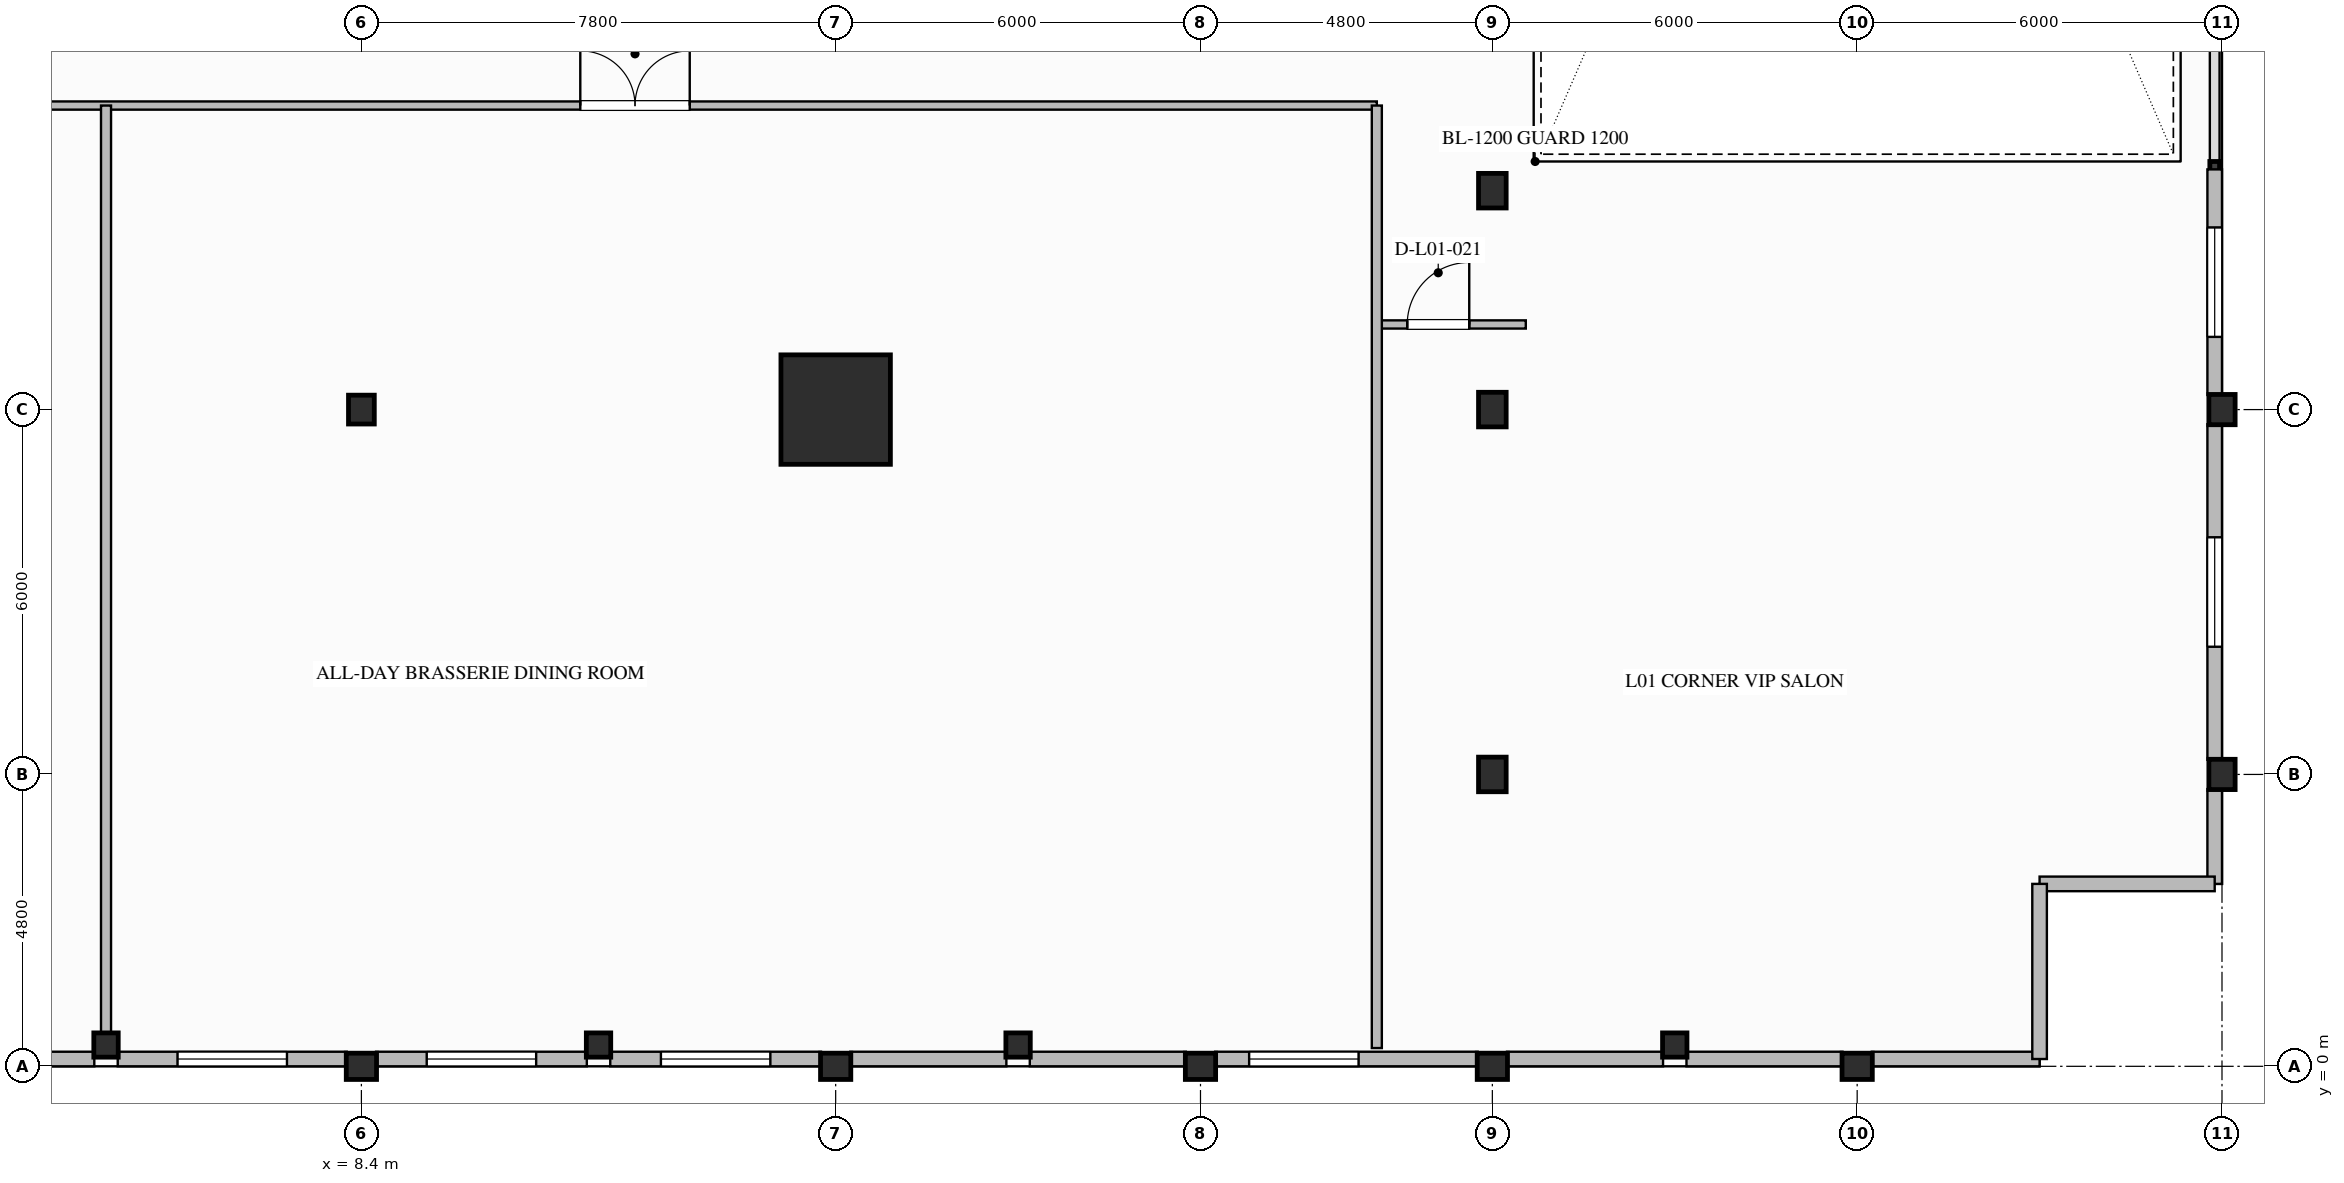
"""IFC4 building model, lengths in metres.
Left out: names, types, materials, properties, quantities, classifications, styles, units other than length and angle.
Written with IfcOpenShell. Run it as: python <this file> out.ifc"""

import sys

from ifc_helpers import new_model, si_unit, direction, frame, frame_2d, origin, origin_2d, place, context, subcontext, project, spatial, rectangle, i_section, extrude, element, fill, save


model = new_model("IFC4")
c1 = context("Model", 3, precision=1e-05, world=origin(), true_north=direction((0.0, 1.0)))
c2 = subcontext(c1, "Body", "Model", "MODEL_VIEW")
j1 = project(units=[si_unit("LENGTHUNIT", "METRE"), si_unit("PLANEANGLEUNIT", "RADIAN")], contexts=[c1])
p1 = place(None, origin())
s1 = spatial("IfcSite", under=j1, at=p1, CompositionType="ELEMENT")
p2 = place(p1, origin())
s2 = spatial("IfcBuilding", under=s1, at=p2, CompositionType="ELEMENT")
p3 = place(p2, frame((0.0, 0.0, 5.6)))
s3 = spatial("IfcBuildingStorey", under=s2, at=p3, CompositionType="ELEMENT", Elevation=5.6)
p4 = place(p3, frame((16.2, 10.8, 0.0), z_axis=(0.0, 0.0, 1.0), x_axis=(1.0, 0.0, 0.0)))
e1 = element("IfcColumn", 1, at=p4, inside=s3, PredefinedType="COLUMN", context=c2, shape_type="SweptSolid", body=[
    extrude(rectangle(XDim=1.8, YDim=1.8, at=origin_2d()), origin(), (0.0, 0.0, 1.0), 5.2),
])
for number, where, z_axis, x_axis in (
    (2, (39.0, 4.8, 0.0), (0.0, 0.0, 1.0), (1.0, 0.0, 0.0)),
    (3, (39.0, 10.8, 0.0), (0.0, 0.0, 1.0), (1.0, 0.0, 0.0)),
    (4, (8.4, 0.0, 0.0), (0.0, 0.0, 1.0), (0.0, 1.0, 0.0)),
    (5, (16.2, 0.0, 0.0), (0.0, 0.0, 1.0), (0.0, 1.0, 0.0)),
    (6, (22.2, 0.0, 0.0), (0.0, 0.0, 1.0), (0.0, 1.0, 0.0)),
    (7, (27.0, 0.0, 0.0), (0.0, 0.0, 1.0), (0.0, 1.0, 0.0)),
    (8, (33.0, 0.0, 0.0), (0.0, 0.0, 1.0), (0.0, 1.0, 0.0)),
):
    element("IfcColumn", number, at=place(p3, frame(where, z_axis=z_axis, x_axis=x_axis)), inside=s3, PredefinedType="COLUMN", context=c2, shape_type="SweptSolid", body=[
        extrude(i_section(OverallWidth=0.432, OverallDepth=0.498, WebThickness=0.056, FlangeThickness=0.089, FilletRadius=0.03, at=origin_2d()), origin(), (0.0, 0.0, 1.0), 5.2),
    ])
for number, where, z_axis, x_axis in (
    (9, (27.0, 4.8, 0.0), (0.0, 0.0, 1.0), (1.0, 0.0, 0.0)),
    (10, (27.0, 10.8, 0.0), (0.0, 0.0, 1.0), (1.0, 0.0, 0.0)),
    (11, (27.0, 14.4, 0.0), (0.0, 0.0, 1.0), (1.0, 0.0, 0.0)),
):
    element("IfcColumn", number, at=place(p3, frame(where, z_axis=z_axis, x_axis=x_axis)), inside=s3, PredefinedType="COLUMN", context=c2, shape_type="SweptSolid", body=[
        extrude(i_section(OverallWidth=0.454, OverallDepth=0.569, WebThickness=0.078, FlangeThickness=0.125, FilletRadius=0.03, at=origin_2d()), origin(), (0.0, 0.0, 1.0), 5.2),
    ])
p5 = place(p3, frame((8.4, 10.8, 0.0), z_axis=(0.0, 0.0, 1.0), x_axis=(1.0, 0.0, 0.0)))
e12 = element("IfcColumn", 12, at=p5, inside=s3, PredefinedType="COLUMN", context=c2, shape_type="SweptSolid", body=[
    extrude(i_section(OverallWidth=0.424, OverallDepth=0.474, WebThickness=0.048, FlangeThickness=0.077, FilletRadius=0.03, at=origin_2d()), origin(), (0.0, 0.0, 1.0), 5.2),
])
for number, where, z_axis, x_axis in (
    (13, (4.2, 0.35, 0.0), (0.0, 0.0, 1.0), (1.0, 0.0, 0.0)),
    (14, (12.3, 0.35, 0.0), (0.0, 0.0, 1.0), (1.0, 0.0, 0.0)),
    (15, (19.2, 0.35, 0.0), (0.0, 0.0, 1.0), (1.0, 0.0, 0.0)),
    (16, (30.0, 0.35, 0.0), (0.0, 0.0, 1.0), (1.0, 0.0, 0.0)),
):
    element("IfcColumn", number, at=place(p3, frame(where, z_axis=z_axis, x_axis=x_axis)), inside=s3, PredefinedType="COLUMN", context=c2, shape_type="SweptSolid", body=[
        extrude(i_section(OverallWidth=0.401, OverallDepth=0.399, WebThickness=0.025, FlangeThickness=0.04, FilletRadius=0.025, at=origin_2d()), origin(), (0.0, 0.0, 1.0), 5.2),
    ])
p6 = place(p3, frame((38.88, 4.559, 0.0), z_axis=(0.0, 0.0, 1.0), x_axis=(0.0, -1.0, 0.0)))
e17 = element("IfcWall", 17, at=p6, inside=s3, PredefinedType="STANDARD", context=c2, shape_type="SweptSolid", body=[
    extrude(rectangle(XDim=1.559, YDim=0.24, at=frame_2d((0.78, 0.0))), origin(), (0.0, 0.0, 1.0), 4.85),
])
p7 = place(p3, frame((38.88, 10.559, 0.0), z_axis=(0.0, 0.0, 1.0), x_axis=(0.0, -1.0, 0.0)))
e18 = element("IfcWall", 18, at=p7, inside=s3, PredefinedType="STANDARD", context=c2, shape_type="SweptSolid", body=[
    extrude(rectangle(XDim=5.518, YDim=0.24, at=frame_2d((2.759, 0.0))), origin(), (0.0, 0.0, 1.0), 4.154),
])
p8 = place(p7, frame((1.859, 0.0, 0.85)))
e19 = element("IfcOpeningElement", 19, at=p8, cuts=e18, PredefinedType="OPENING", context=c2, shape_type="SweptSolid", body=[
    extrude(rectangle(XDim=1.8, YDim=2.2, at=frame_2d((0.9, 1.1))), frame((0.0, 0.13, 0.0), z_axis=(0.0, -1.0, 0.0), x_axis=(1.0, 0.0, 0.0)), (0.0, 0.0, 1.0), 0.26),
])
p9 = place(p3, frame((38.88, 14.75, 0.0), z_axis=(0.0, 0.0, 1.0), x_axis=(0.0, -1.0, 0.0)))
e20 = element("IfcWall", 20, at=p9, inside=s3, PredefinedType="STANDARD", context=c2, shape_type="SweptSolid", body=[
    extrude(rectangle(XDim=3.709, YDim=0.24, at=frame_2d((1.854, 0.0))), origin(), (0.0, 0.0, 1.0), 4.154),
])
p10 = place(p9, frame((0.955, 0.0, 0.85)))
e21 = element("IfcOpeningElement", 21, at=p10, cuts=e20, PredefinedType="OPENING", context=c2, shape_type="SweptSolid", body=[
    extrude(rectangle(XDim=1.8, YDim=2.2, at=frame_2d((0.9, 1.1))), frame((0.0, 0.13, 0.0), z_axis=(0.0, -1.0, 0.0), x_axis=(1.0, 0.0, 0.0)), (0.0, 0.0, 1.0), 0.26),
])
p11 = place(p3, frame((4.007, 0.12, 0.0), z_axis=(0.0, 0.0, 1.0), x_axis=(-1.0, 0.0, 0.0)))
e22 = element("IfcWall", 22, at=p11, inside=s3, PredefinedType="STANDARD", context=c2, shape_type="SweptSolid", body=[
    extrude(rectangle(XDim=3.766, YDim=0.24, at=frame_2d((1.883, 0.0))), origin(), (0.0, 0.0, 1.0), 4.154),
])
p12 = place(p11, frame((0.983, 0.0, 0.65)))
e23 = element("IfcOpeningElement", 23, at=p12, cuts=e22, PredefinedType="OPENING", context=c2, shape_type="SweptSolid", body=[
    extrude(rectangle(XDim=1.8, YDim=2.2, at=frame_2d((0.9, 1.1))), frame((0.0, 0.13, 0.0), z_axis=(0.0, -1.0, 0.0), x_axis=(1.0, 0.0, 0.0)), (0.0, 0.0, 1.0), 0.26),
])
p13 = place(p3, frame((8.159, 0.12, 0.0), z_axis=(0.0, 0.0, 1.0), x_axis=(-1.0, 0.0, 0.0)))
e24 = element("IfcWall", 24, at=p13, inside=s3, PredefinedType="STANDARD", context=c2, shape_type="SweptSolid", body=[
    extrude(rectangle(XDim=3.767, YDim=0.24, at=frame_2d((1.883, 0.0))), origin(), (0.0, 0.0, 1.0), 4.154),
])
p14 = place(p13, frame((0.983, 0.0, 0.65)))
e25 = element("IfcOpeningElement", 25, at=p14, cuts=e24, PredefinedType="OPENING", context=c2, shape_type="SweptSolid", body=[
    extrude(rectangle(XDim=1.8, YDim=2.2, at=frame_2d((0.9, 1.1))), frame((0.0, 0.13, 0.0), z_axis=(0.0, -1.0, 0.0), x_axis=(1.0, 0.0, 0.0)), (0.0, 0.0, 1.0), 0.26),
])
p15 = place(p3, frame((12.107, 0.12, 0.0), z_axis=(0.0, 0.0, 1.0), x_axis=(-1.0, 0.0, 0.0)))
e26 = element("IfcWall", 26, at=p15, inside=s3, PredefinedType="STANDARD", context=c2, shape_type="SweptSolid", body=[
    extrude(rectangle(XDim=3.467, YDim=0.24, at=frame_2d((1.733, 0.0))), origin(), (0.0, 0.0, 1.0), 4.154),
])
p16 = place(p15, frame((0.833, 0.0, 0.65)))
e27 = element("IfcOpeningElement", 27, at=p16, cuts=e26, PredefinedType="OPENING", context=c2, shape_type="SweptSolid", body=[
    extrude(rectangle(XDim=1.8, YDim=2.2, at=frame_2d((0.9, 1.1))), frame((0.0, 0.13, 0.0), z_axis=(0.0, -1.0, 0.0), x_axis=(1.0, 0.0, 0.0)), (0.0, 0.0, 1.0), 0.26),
])
p17 = place(p3, frame((15.959, 0.12, 0.0), z_axis=(0.0, 0.0, 1.0), x_axis=(-1.0, 0.0, 0.0)))
e28 = element("IfcWall", 28, at=p17, inside=s3, PredefinedType="STANDARD", context=c2, shape_type="SweptSolid", body=[
    extrude(rectangle(XDim=3.466, YDim=0.24, at=frame_2d((1.733, 0.0))), origin(), (0.0, 0.0, 1.0), 4.154),
])
p18 = place(p17, frame((0.833, 0.0, 0.65)))
e29 = element("IfcOpeningElement", 29, at=p18, cuts=e28, PredefinedType="OPENING", context=c2, shape_type="SweptSolid", body=[
    extrude(rectangle(XDim=1.8, YDim=2.2, at=frame_2d((0.9, 1.1))), frame((0.0, 0.13, 0.0), z_axis=(0.0, -1.0, 0.0), x_axis=(1.0, 0.0, 0.0)), (0.0, 0.0, 1.0), 0.26),
])
for number, where, z_axis, x_axis in (
    (30, (19.007, 0.12, 0.0), (0.0, 0.0, 1.0), (-1.0, 0.0, 0.0)),
    (31, (21.959, 0.12, 0.0), (0.0, 0.0, 1.0), (-1.0, 0.0, 0.0)),
):
    element("IfcWall", number, at=place(p3, frame(where, z_axis=z_axis, x_axis=x_axis)), inside=s3, PredefinedType="STANDARD", context=c2, shape_type="SweptSolid", body=[
        extrude(rectangle(XDim=2.566, YDim=0.24, at=frame_2d((1.283, 0.0))), origin(), (0.0, 0.0, 1.0), 4.154),
    ])
p19 = place(p3, frame((26.759, 0.12, 0.0), z_axis=(0.0, 0.0, 1.0), x_axis=(-1.0, 0.0, 0.0)))
e32 = element("IfcWall", 32, at=p19, inside=s3, PredefinedType="STANDARD", context=c2, shape_type="SweptSolid", body=[
    extrude(rectangle(XDim=4.318, YDim=0.24, at=frame_2d((2.159, 0.0))), origin(), (0.0, 0.0, 1.0), 4.154),
])
p20 = place(p19, frame((1.959, 0.0, 0.65)))
e33 = element("IfcOpeningElement", 33, at=p20, cuts=e32, PredefinedType="OPENING", context=c2, shape_type="SweptSolid", body=[
    extrude(rectangle(XDim=1.8, YDim=2.2, at=frame_2d((0.9, 1.1))), frame((0.0, 0.13, 0.0), z_axis=(0.0, -1.0, 0.0), x_axis=(1.0, 0.0, 0.0)), (0.0, 0.0, 1.0), 0.26),
])
for number, where, z_axis, x_axis in (
    (34, (29.807, 0.12, 0.0), (0.0, 0.0, 1.0), (-1.0, 0.0, 0.0)),
    (35, (32.759, 0.12, 0.0), (0.0, 0.0, 1.0), (-1.0, 0.0, 0.0)),
):
    element("IfcWall", number, at=place(p3, frame(where, z_axis=z_axis, x_axis=x_axis)), inside=s3, PredefinedType="STANDARD", context=c2, shape_type="SweptSolid", body=[
        extrude(rectangle(XDim=2.566, YDim=0.24, at=frame_2d((1.283, 0.0))), origin(), (0.0, 0.0, 1.0), 4.154),
    ])
p21 = place(p3, frame((36.0, 0.12, 0.0), z_axis=(0.0, 0.0, 1.0), x_axis=(-1.0, 0.0, 0.0)))
e36 = element("IfcWall", 36, at=p21, inside=s3, PredefinedType="STANDARD", context=c2, shape_type="SweptSolid", body=[
    extrude(rectangle(XDim=2.759, YDim=0.24, at=frame_2d((1.379, 0.0))), origin(), (0.0, 0.0, 1.0), 4.85),
])
for number, where, z_axis, x_axis in (
    (37, (38.88, 3.0, 0.0), (0.0, 0.0, 1.0), (-1.0, 0.0, 0.0)),
    (38, (36.0, 3.0, 0.0), (0.0, 0.0, 1.0), (0.0, -1.0, 0.0)),
):
    element("IfcWall", number, at=place(p3, frame(where, z_axis=z_axis, x_axis=x_axis)), inside=s3, PredefinedType="STANDARD", context=c2, shape_type="SweptSolid", body=[
        extrude(rectangle(XDim=2.88, YDim=0.24, at=frame_2d((1.44, 0.0))), origin(), (0.0, 0.0, 1.0), 4.85),
    ])
p22 = place(p3, frame((-21.2, 15.8, 0.0), z_axis=(0.0, 0.0, 1.0), x_axis=(1.0, 0.0, 0.0)))
e39 = element("IfcWall", 39, at=p22, inside=s3, PredefinedType="PARTITIONING", context=c2, shape_type="SweptSolid", body=[
    extrude(rectangle(XDim=46.3, YDim=0.135, at=frame_2d((23.15, 0.0))), origin(), (0.0, 0.0, 1.0), 4.85),
])
p23 = place(p22, frame((6.0, 0.0, 0.0)))
e40 = element("IfcOpeningElement", 40, at=p23, cuts=e39, PredefinedType="OPENING", context=c2, shape_type="SweptSolid", body=[
    extrude(rectangle(XDim=1.8, YDim=2.35, at=frame_2d((0.9, 1.175))), frame((0.0, 0.077, 0.0), z_axis=(0.0, -1.0, 0.0), x_axis=(1.0, 0.0, 0.0)), (0.0, 0.0, 1.0), 0.155),
])
p24 = place(p22, frame((33.2, 0.0, 0.0)))
e41 = element("IfcOpeningElement", 41, at=p24, cuts=e39, PredefinedType="OPENING", context=c2, shape_type="SweptSolid", body=[
    extrude(rectangle(XDim=1.8, YDim=2.35, at=frame_2d((0.9, 1.175))), frame((0.0, 0.077, 0.0), z_axis=(0.0, -1.0, 0.0), x_axis=(1.0, 0.0, 0.0)), (0.0, 0.0, 1.0), 0.155),
])
p25 = place(p3, frame((25.1, 12.2, 0.0), z_axis=(0.0, 0.0, 1.0), x_axis=(1.0, 0.0, 0.0)))
e42 = element("IfcWall", 42, at=p25, inside=s3, PredefinedType="PARTITIONING", context=c2, shape_type="SweptSolid", body=[
    extrude(rectangle(XDim=2.45, YDim=0.135, at=frame_2d((1.225, 0.0))), origin(), (0.0, 0.0, 1.0), 4.85),
])
p26 = place(p25, frame((0.5, 0.0, 0.0)))
e43 = element("IfcOpeningElement", 43, at=p26, cuts=e42, PredefinedType="OPENING", context=c2, shape_type="SweptSolid", body=[
    extrude(rectangle(XDim=1.02, YDim=2.15, at=frame_2d((0.51, 1.075))), frame((0.0, 0.077, 0.0), z_axis=(0.0, -1.0, 0.0), x_axis=(1.0, 0.0, 0.0)), (0.0, 0.0, 1.0), 0.155),
])
for number, where, z_axis, x_axis in (
    (44, (25.1, 0.3, 0.0), (0.0, 0.0, 1.0), (0.0, 1.0, 0.0)),
    (45, (4.2, 0.3, 0.0), (0.0, 0.0, 1.0), (0.0, 1.0, 0.0)),
):
    element("IfcWall", number, at=place(p3, frame(where, z_axis=z_axis, x_axis=x_axis)), inside=s3, PredefinedType="PARTITIONING", context=c2, shape_type="SweptSolid", body=[
        extrude(rectangle(XDim=15.5, YDim=0.165, at=frame_2d((7.75, 0.0))), origin(), (0.0, 0.0, 1.0), 4.85),
    ])
p27 = place(p8, origin())
e46 = element("IfcWindow", 46, at=p27, inside=s3, PartitioningType="SINGLE_PANEL", PredefinedType="WINDOW", context=c2, shape_type="SweptSolid", body=[
    extrude(rectangle(XDim=1.8, YDim=2.2, at=frame_2d((0.9, 1.1))), frame((0.0, 0.03, 0.0), z_axis=(0.0, -1.0, 0.0), x_axis=(1.0, 0.0, 0.0)), (0.0, 0.0, 1.0), 0.06),
])
fill(e19, e46)
p28 = place(p10, origin())
e47 = element("IfcWindow", 47, at=p28, inside=s3, PartitioningType="SINGLE_PANEL", PredefinedType="WINDOW", context=c2, shape_type="SweptSolid", body=[
    extrude(rectangle(XDim=1.8, YDim=2.2, at=frame_2d((0.9, 1.1))), frame((0.0, 0.03, 0.0), z_axis=(0.0, -1.0, 0.0), x_axis=(1.0, 0.0, 0.0)), (0.0, 0.0, 1.0), 0.06),
])
fill(e21, e47)
p29 = place(p14, origin())
e48 = element("IfcWindow", 48, at=p29, inside=s3, PartitioningType="SINGLE_PANEL", PredefinedType="WINDOW", context=c2, shape_type="SweptSolid", body=[
    extrude(rectangle(XDim=1.8, YDim=2.2, at=frame_2d((0.9, 1.1))), frame((0.0, 0.03, 0.0), z_axis=(0.0, -1.0, 0.0), x_axis=(1.0, 0.0, 0.0)), (0.0, 0.0, 1.0), 0.06),
])
fill(e25, e48)
p30 = place(p16, origin())
e49 = element("IfcWindow", 49, at=p30, inside=s3, PartitioningType="SINGLE_PANEL", PredefinedType="WINDOW", context=c2, shape_type="SweptSolid", body=[
    extrude(rectangle(XDim=1.8, YDim=2.2, at=frame_2d((0.9, 1.1))), frame((0.0, 0.03, 0.0), z_axis=(0.0, -1.0, 0.0), x_axis=(1.0, 0.0, 0.0)), (0.0, 0.0, 1.0), 0.06),
])
fill(e27, e49)
p31 = place(p18, origin())
e50 = element("IfcWindow", 50, at=p31, inside=s3, PartitioningType="SINGLE_PANEL", PredefinedType="WINDOW", context=c2, shape_type="SweptSolid", body=[
    extrude(rectangle(XDim=1.8, YDim=2.2, at=frame_2d((0.9, 1.1))), frame((0.0, 0.03, 0.0), z_axis=(0.0, -1.0, 0.0), x_axis=(1.0, 0.0, 0.0)), (0.0, 0.0, 1.0), 0.06),
])
fill(e29, e50)
p32 = place(p20, origin())
e51 = element("IfcWindow", 51, at=p32, inside=s3, PartitioningType="SINGLE_PANEL", PredefinedType="WINDOW", context=c2, shape_type="SweptSolid", body=[
    extrude(rectangle(XDim=1.8, YDim=2.2, at=frame_2d((0.9, 1.1))), frame((0.0, 0.03, 0.0), z_axis=(0.0, -1.0, 0.0), x_axis=(1.0, 0.0, 0.0)), (0.0, 0.0, 1.0), 0.06),
])
fill(e33, e51)
p33 = place(p26, origin())
e52 = element("IfcDoor", 52, at=p33, inside=s3, OperationType="SINGLE_SWING_RIGHT", PredefinedType="DOOR", context=c2, shape_type="SweptSolid", body=[
    extrude(rectangle(XDim=1.02, YDim=2.15, at=frame_2d((0.51, 1.075))), frame((0.0, 0.025, 0.0), z_axis=(0.0, -1.0, 0.0), x_axis=(1.0, 0.0, 0.0)), (0.0, 0.0, 1.0), 0.05),
])
fill(e43, e52)
p34 = place(p24, origin())
e53 = element("IfcDoor", 53, at=p34, inside=s3, OperationType="DOUBLE_DOOR_SINGLE_SWING", PredefinedType="DOOR", context=c2, shape_type="SweptSolid", body=[
    extrude(rectangle(XDim=1.8, YDim=2.35, at=frame_2d((0.9, 1.175))), frame((0.0, 0.025, 0.0), z_axis=(0.0, -1.0, 0.0), x_axis=(1.0, 0.0, 0.0)), (0.0, 0.0, 1.0), 0.05),
])
fill(e41, e53)
save(model, sys.argv[1])
